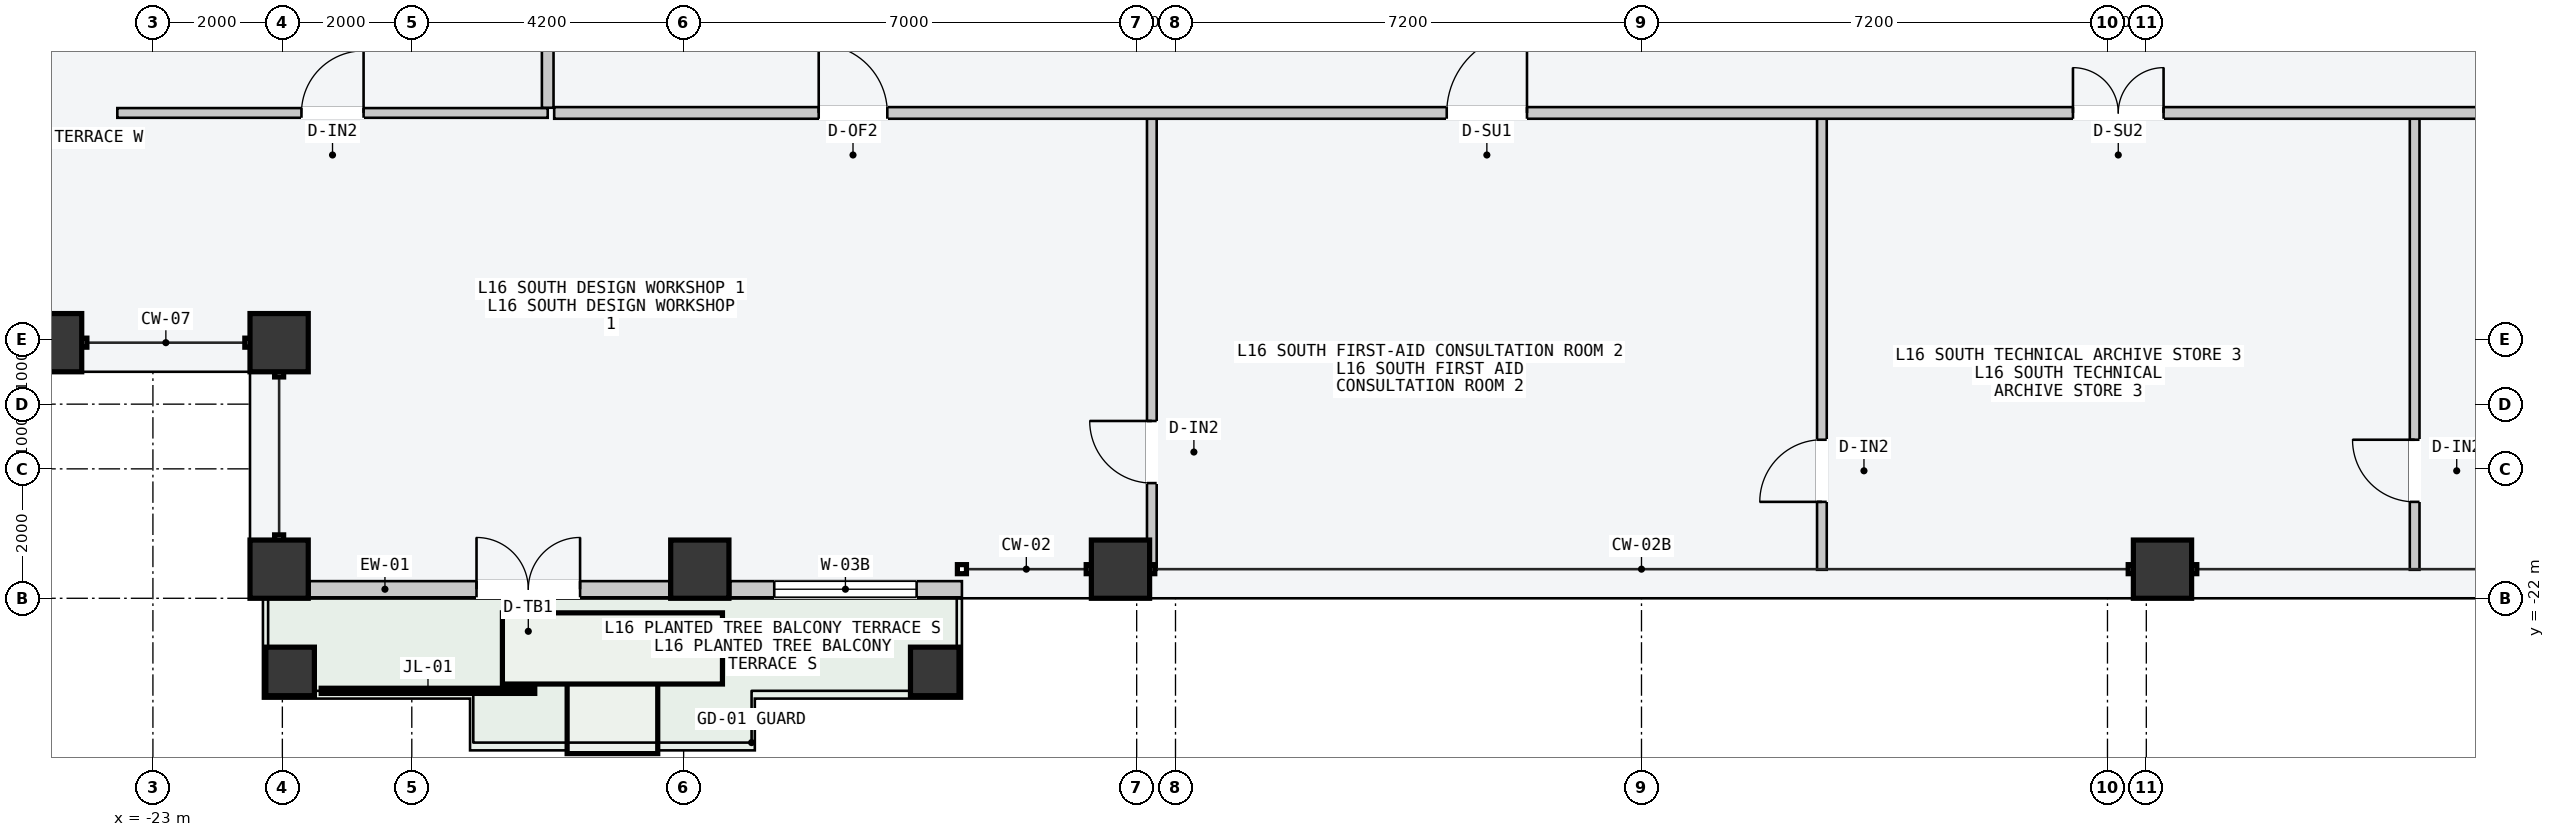
"""IFC4 building model, lengths in metres.
Left out: names, types, materials, properties, quantities, classifications, styles, units other than length and angle.
Written with IfcOpenShell. Run it as: python <this file> out.ifc"""

import sys

from ifc_helpers import new_model, si_unit, direction, frame, frame_2d, origin, origin_2d, place, context, subcontext, project, spatial, rectangle, hollow_rectangle, extrude, element, fill, save


model = new_model("IFC4")
c1 = context("Model", 3, precision=1e-05, world=origin(), true_north=direction((0.0, 1.0)))
c2 = subcontext(c1, "Body", "Model", "MODEL_VIEW")
j1 = project(units=[si_unit("LENGTHUNIT", "METRE"), si_unit("PLANEANGLEUNIT", "RADIAN")], contexts=[c1])
p1 = place(None, origin())
s1 = spatial("IfcSite", under=j1, at=p1, CompositionType="ELEMENT")
p2 = place(p1, origin())
s2 = spatial("IfcBuilding", under=s1, at=p2, CompositionType="ELEMENT")
p3 = place(p2, frame((0.0, 0.0, 63.6)))
s3 = spatial("IfcBuildingStorey", under=s2, at=p3, CompositionType="ELEMENT", Elevation=63.6)
for number, where, z_axis, x_axis in (
    (1, (-21.05, -21.55, 0.0), (0.0, 0.0, 1.0), (1.0, 0.0, 0.0)),
    (2, (-14.55, -21.55, 0.0), (0.0, 0.0, 1.0), (1.0, 0.0, 0.0)),
    (3, (-8.05, -21.55, 0.0), (0.0, 0.0, 1.0), (1.0, 0.0, 0.0)),
    (4, (8.05, -21.55, 0.0), (0.0, 0.0, 1.0), (1.0, 0.0, 0.0)),
    (5, (-24.55, -18.05, 0.0), (0.0, 0.0, 1.0), (0.0, 1.0, 0.0)),
    (6, (-21.05, -18.05, 0.0), (0.0, 0.0, 1.0), (1.0, 0.0, 0.0)),
):
    element("IfcColumn", number, at=place(p3, frame(where, z_axis=z_axis, x_axis=x_axis)), inside=s3, PredefinedType="COLUMN", context=c2, shape_type="SweptSolid", body=[
        extrude(hollow_rectangle(XDim=0.9, YDim=0.9, WallThickness=0.045, at=origin_2d()), origin(), (0.0, 0.0, 1.0), 3.6),
    ])
for number, where, z_axis, x_axis in (
    (7, (-20.88, -23.13, 0.0), (0.0, 0.0, 1.0), (1.0, 0.0, 0.0)),
    (8, (-10.92, -23.13, 0.0), (0.0, 0.0, 1.0), (1.0, 0.0, 0.0)),
):
    element("IfcColumn", number, at=place(p3, frame(where, z_axis=z_axis, x_axis=x_axis)), inside=s3, PredefinedType="COLUMN", context=c2, shape_type="SweptSolid", body=[
        extrude(hollow_rectangle(XDim=0.75, YDim=0.75, WallThickness=0.032, at=origin_2d()), origin(), (0.0, 0.0, 1.0), 3.6),
    ])
p4 = place(p3, frame((-20.58, -21.86, 0.0), z_axis=(0.0, 0.0, 1.0), x_axis=(1.0, 0.0, 0.0)))
e9 = element("IfcWall", 9, at=p4, inside=s3, PredefinedType="STANDARD", context=c2, shape_type="SweptSolid", body=[
    extrude(rectangle(XDim=5.56, YDim=0.25, at=frame_2d((2.78, 0.0))), origin(), (0.0, 0.0, 1.0), 3.4),
])
p5 = place(p4, frame((2.58, 0.0, 0.0)))
e10 = element("IfcOpeningElement", 10, at=p5, cuts=e9, PredefinedType="OPENING", context=c2, shape_type="SweptSolid", body=[
    extrude(rectangle(XDim=1.6, YDim=2.2, at=frame_2d((0.8, 1.1))), frame((0.0, 0.135, 0.0), z_axis=(0.0, -1.0, 0.0), x_axis=(1.0, 0.0, 0.0)), (0.0, 0.0, 1.0), 0.27),
])
p6 = place(p3, frame((-14.08, -21.86, 0.0), z_axis=(0.0, 0.0, 1.0), x_axis=(1.0, 0.0, 0.0)))
e11 = element("IfcWall", 11, at=p6, inside=s3, PredefinedType="STANDARD", context=c2, shape_type="SweptSolid", body=[
    extrude(rectangle(XDim=3.58, YDim=0.25, at=frame_2d((1.79, 0.0))), origin(), (0.0, 0.0, 1.0), 3.4),
])
p7 = place(p6, frame((0.68, 0.0, 0.85)))
e12 = element("IfcOpeningElement", 12, at=p7, cuts=e11, PredefinedType="OPENING", context=c2, shape_type="SweptSolid", body=[
    extrude(rectangle(XDim=2.2, YDim=2.1, at=frame_2d((1.1, 1.05))), frame((0.0, 0.135, 0.0), z_axis=(0.0, -1.0, 0.0), x_axis=(1.0, 0.0, 0.0)), (0.0, 0.0, 1.0), 0.27),
])
p8 = place(p3, frame((-7.566, -21.56, 0.0), z_axis=(0.0, 0.0, 1.0), x_axis=(0.0, 1.0, 0.0)))
e13 = element("IfcWall", 13, at=p8, inside=s3, PredefinedType="PARTITIONING", context=c2, shape_type="SweptSolid", body=[
    extrude(rectangle(XDim=7.0, YDim=0.15, at=frame_2d((3.5, 0.0))), origin(), (0.0, 0.0, 1.0), 3.4),
])
p9 = place(p8, frame((1.34, 0.0, 0.0)))
e14 = element("IfcOpeningElement", 14, at=p9, cuts=e13, PredefinedType="OPENING", context=c2, shape_type="SweptSolid", body=[
    extrude(rectangle(XDim=0.96, YDim=2.18, at=frame_2d((0.48, 1.09))), frame((0.0, 0.085, 0.0), z_axis=(0.0, -1.0, 0.0), x_axis=(1.0, 0.0, 0.0)), (0.0, 0.0, 1.0), 0.17),
])
p10 = place(p3, frame((2.787, -21.56, 0.0), z_axis=(0.0, 0.0, 1.0), x_axis=(0.0, 1.0, 0.0)))
e15 = element("IfcWall", 15, at=p10, inside=s3, PredefinedType="PARTITIONING", context=c2, shape_type="SweptSolid", body=[
    extrude(rectangle(XDim=7.0, YDim=0.15, at=frame_2d((3.5, 0.0))), origin(), (0.0, 0.0, 1.0), 3.4),
])
p11 = place(p10, frame((1.05, 0.0, 0.0)))
e16 = element("IfcOpeningElement", 16, at=p11, cuts=e15, PredefinedType="OPENING", context=c2, shape_type="SweptSolid", body=[
    extrude(rectangle(XDim=0.96, YDim=2.18, at=frame_2d((0.48, 1.09))), frame((0.0, 0.085, 0.0), z_axis=(0.0, -1.0, 0.0), x_axis=(1.0, 0.0, 0.0)), (0.0, 0.0, 1.0), 0.17),
])
p12 = place(p3, frame((11.946, -21.56, 0.0), z_axis=(0.0, 0.0, 1.0), x_axis=(0.0, 1.0, 0.0)))
e17 = element("IfcWall", 17, at=p12, inside=s3, PredefinedType="PARTITIONING", context=c2, shape_type="SweptSolid", body=[
    extrude(rectangle(XDim=7.0, YDim=0.15, at=frame_2d((3.5, 0.0))), origin(), (0.0, 0.0, 1.0), 3.4),
])
p13 = place(p12, frame((1.05, 0.0, 0.0)))
e18 = element("IfcOpeningElement", 18, at=p13, cuts=e17, PredefinedType="OPENING", context=c2, shape_type="SweptSolid", body=[
    extrude(rectangle(XDim=0.96, YDim=2.18, at=frame_2d((0.48, 1.09))), frame((0.0, 0.085, 0.0), z_axis=(0.0, -1.0, 0.0), x_axis=(1.0, 0.0, 0.0)), (0.0, 0.0, 1.0), 0.17),
])
p14 = place(p3, frame((-16.8, -14.5, 0.0), z_axis=(0.0, 0.0, 1.0), x_axis=(1.0, 0.0, 0.0)))
e19 = element("IfcWall", 19, at=p14, inside=s3, PredefinedType="PARTITIONING", context=c2, shape_type="SweptSolid", body=[
    extrude(rectangle(XDim=33.6, YDim=0.18, at=frame_2d((16.8, 0.0))), origin(), (0.0, 0.0, 1.0), 3.4),
])
p15 = place(p14, frame((4.087, 0.0, 0.0)))
e20 = element("IfcOpeningElement", 20, at=p15, cuts=e19, PredefinedType="OPENING", context=c2, shape_type="SweptSolid", body=[
    extrude(rectangle(XDim=1.06, YDim=2.2, at=frame_2d((0.53, 1.1))), frame((0.0, 0.1, 0.0), z_axis=(0.0, -1.0, 0.0), x_axis=(1.0, 0.0, 0.0)), (0.0, 0.0, 1.0), 0.2),
])
p16 = place(p14, frame((13.791, 0.0, 0.0)))
e21 = element("IfcOpeningElement", 21, at=p16, cuts=e19, PredefinedType="OPENING", context=c2, shape_type="SweptSolid", body=[
    extrude(rectangle(XDim=1.24, YDim=2.24, at=frame_2d((0.62, 1.12))), frame((0.0, 0.1, 0.0), z_axis=(0.0, -1.0, 0.0), x_axis=(1.0, 0.0, 0.0)), (0.0, 0.0, 1.0), 0.2),
])
p17 = place(p14, frame((23.467, 0.0, 0.0)))
e22 = element("IfcOpeningElement", 22, at=p17, cuts=e19, PredefinedType="OPENING", context=c2, shape_type="SweptSolid", body=[
    extrude(rectangle(XDim=1.4, YDim=2.2, at=frame_2d((0.7, 1.1))), frame((0.0, 0.1, 0.0), z_axis=(0.0, -1.0, 0.0), x_axis=(1.0, 0.0, 0.0)), (0.0, 0.0, 1.0), 0.2),
])
p18 = place(p14, frame((30.723, 0.0, 0.0)))
e23 = element("IfcOpeningElement", 23, at=p18, cuts=e19, PredefinedType="OPENING", context=c2, shape_type="SweptSolid", body=[
    extrude(rectangle(XDim=0.9, YDim=2.15, at=frame_2d((0.45, 1.075))), frame((0.0, 0.1, 0.0), z_axis=(0.0, -1.0, 0.0), x_axis=(1.0, 0.0, 0.0)), (0.0, 0.0, 1.0), 0.2),
])
p19 = place(p3, frame((-23.55, -14.5, 0.0), z_axis=(0.0, 0.0, 1.0), x_axis=(1.0, 0.0, 0.0)))
e24 = element("IfcWall", 24, at=p19, inside=s3, PredefinedType="PARTITIONING", context=c2, shape_type="SweptSolid", body=[
    extrude(rectangle(XDim=6.65, YDim=0.15, at=frame_2d((3.325, 0.0))), origin(), (0.0, 0.0, 1.0), 3.4),
])
p20 = place(p19, frame((2.845, 0.0, 0.0)))
e25 = element("IfcOpeningElement", 25, at=p20, cuts=e24, PredefinedType="OPENING", context=c2, shape_type="SweptSolid", body=[
    extrude(rectangle(XDim=0.96, YDim=2.18, at=frame_2d((0.48, 1.09))), frame((0.0, 0.085, 0.0), z_axis=(0.0, -1.0, 0.0), x_axis=(1.0, 0.0, 0.0)), (0.0, 0.0, 1.0), 0.17),
])
p21 = place(p3, frame((-16.9, -14.42, 0.0), z_axis=(0.0, 0.0, 1.0), x_axis=(0.0, 1.0, 0.0)))
e26 = element("IfcWall", 26, at=p21, inside=s3, PredefinedType="PARTITIONING", context=c2, shape_type="SweptSolid", body=[
    extrude(rectangle(XDim=26.54, YDim=0.18, at=frame_2d((13.27, 0.0))), origin(), (0.0, 0.0, 1.0), 3.4),
])
p22 = place(p21, frame((5.094, 0.0, 0.0)))
e27 = element("IfcOpeningElement", 27, at=p22, cuts=e26, PredefinedType="OPENING", context=c2, shape_type="SweptSolid", body=[
    extrude(rectangle(XDim=0.96, YDim=2.18, at=frame_2d((0.48, 1.09))), frame((0.0, 0.1, 0.0), z_axis=(0.0, -1.0, 0.0), x_axis=(1.0, 0.0, 0.0)), (0.0, 0.0, 1.0), 0.2),
])
p23 = place(p21, frame((18.333, 0.0, 0.0)))
e28 = element("IfcOpeningElement", 28, at=p23, cuts=e26, PredefinedType="OPENING", context=c2, shape_type="SweptSolid", body=[
    extrude(rectangle(XDim=1.02, YDim=2.2, at=frame_2d((0.51, 1.1))), frame((0.0, 0.1, 0.0), z_axis=(0.0, -1.0, 0.0), x_axis=(1.0, 0.0, 0.0)), (0.0, 0.0, 1.0), 0.2),
])
p24 = place(p5, origin())
e29 = element("IfcDoor", 29, at=p24, inside=s3, OperationType="DOUBLE_DOOR_SINGLE_SWING", PredefinedType="DOOR", context=c2, shape_type="SweptSolid", body=[
    extrude(rectangle(XDim=1.6, YDim=2.2, at=frame_2d((0.8, 1.1))), frame((0.0, 0.025, 0.0), z_axis=(0.0, -1.0, 0.0), x_axis=(1.0, 0.0, 0.0)), (0.0, 0.0, 1.0), 0.05),
])
fill(e10, e29)
p25 = place(p7, origin())
e30 = element("IfcWindow", 30, at=p25, inside=s3, PartitioningType="SINGLE_PANEL", PredefinedType="WINDOW", context=c2, shape_type="SweptSolid", body=[
    extrude(rectangle(XDim=2.2, YDim=2.1, at=frame_2d((1.1, 1.05))), frame((0.0, 0.03, 0.0), z_axis=(0.0, -1.0, 0.0), x_axis=(1.0, 0.0, 0.0)), (0.0, 0.0, 1.0), 0.06),
])
fill(e12, e30)
p26 = place(p9, origin())
e31 = element("IfcDoor", 31, at=p26, inside=s3, OperationType="SINGLE_SWING_RIGHT", PredefinedType="DOOR", context=c2, shape_type="SweptSolid", body=[
    extrude(rectangle(XDim=0.96, YDim=2.18, at=frame_2d((0.48, 1.09))), frame((0.0, 0.025, 0.0), z_axis=(0.0, -1.0, 0.0), x_axis=(1.0, 0.0, 0.0)), (0.0, 0.0, 1.0), 0.05),
])
fill(e14, e31)
p27 = place(p11, origin())
e32 = element("IfcDoor", 32, at=p27, inside=s3, OperationType="SINGLE_SWING_LEFT", PredefinedType="DOOR", context=c2, shape_type="SweptSolid", body=[
    extrude(rectangle(XDim=0.96, YDim=2.18, at=frame_2d((0.48, 1.09))), frame((0.0, 0.025, 0.0), z_axis=(0.0, -1.0, 0.0), x_axis=(1.0, 0.0, 0.0)), (0.0, 0.0, 1.0), 0.05),
])
fill(e16, e32)
p28 = place(p13, origin())
e33 = element("IfcDoor", 33, at=p28, inside=s3, OperationType="SINGLE_SWING_RIGHT", PredefinedType="DOOR", context=c2, shape_type="SweptSolid", body=[
    extrude(rectangle(XDim=0.96, YDim=2.18, at=frame_2d((0.48, 1.09))), frame((0.0, 0.025, 0.0), z_axis=(0.0, -1.0, 0.0), x_axis=(1.0, 0.0, 0.0)), (0.0, 0.0, 1.0), 0.05),
])
fill(e18, e33)
p29 = place(p15, origin())
e34 = element("IfcDoor", 34, at=p29, inside=s3, OperationType="SINGLE_SWING_LEFT", PredefinedType="DOOR", context=c2, shape_type="SweptSolid", body=[
    extrude(rectangle(XDim=1.06, YDim=2.2, at=frame_2d((0.53, 1.1))), frame((0.0, 0.025, 0.0), z_axis=(0.0, -1.0, 0.0), x_axis=(1.0, 0.0, 0.0)), (0.0, 0.0, 1.0), 0.05),
])
fill(e20, e34)
p30 = place(p16, origin())
e35 = element("IfcDoor", 35, at=p30, inside=s3, OperationType="SINGLE_SWING_RIGHT", PredefinedType="DOOR", context=c2, shape_type="SweptSolid", body=[
    extrude(rectangle(XDim=1.24, YDim=2.24, at=frame_2d((0.62, 1.12))), frame((0.0, 0.025, 0.0), z_axis=(0.0, -1.0, 0.0), x_axis=(1.0, 0.0, 0.0)), (0.0, 0.0, 1.0), 0.05),
])
fill(e21, e35)
p31 = place(p17, origin())
e36 = element("IfcDoor", 36, at=p31, inside=s3, OperationType="DOUBLE_DOOR_SINGLE_SWING", PredefinedType="DOOR", context=c2, shape_type="SweptSolid", body=[
    extrude(rectangle(XDim=1.4, YDim=2.2, at=frame_2d((0.7, 1.1))), frame((0.0, 0.025, 0.0), z_axis=(0.0, -1.0, 0.0), x_axis=(1.0, 0.0, 0.0)), (0.0, 0.0, 1.0), 0.05),
])
fill(e22, e36)
p32 = place(p20, origin())
e37 = element("IfcDoor", 37, at=p32, inside=s3, OperationType="SINGLE_SWING_RIGHT", PredefinedType="DOOR", context=c2, shape_type="SweptSolid", body=[
    extrude(rectangle(XDim=0.96, YDim=2.18, at=frame_2d((0.48, 1.09))), frame((0.0, 0.025, 0.0), z_axis=(0.0, -1.0, 0.0), x_axis=(1.0, 0.0, 0.0)), (0.0, 0.0, 1.0), 0.05),
])
fill(e25, e37)
save(model, sys.argv[1])
